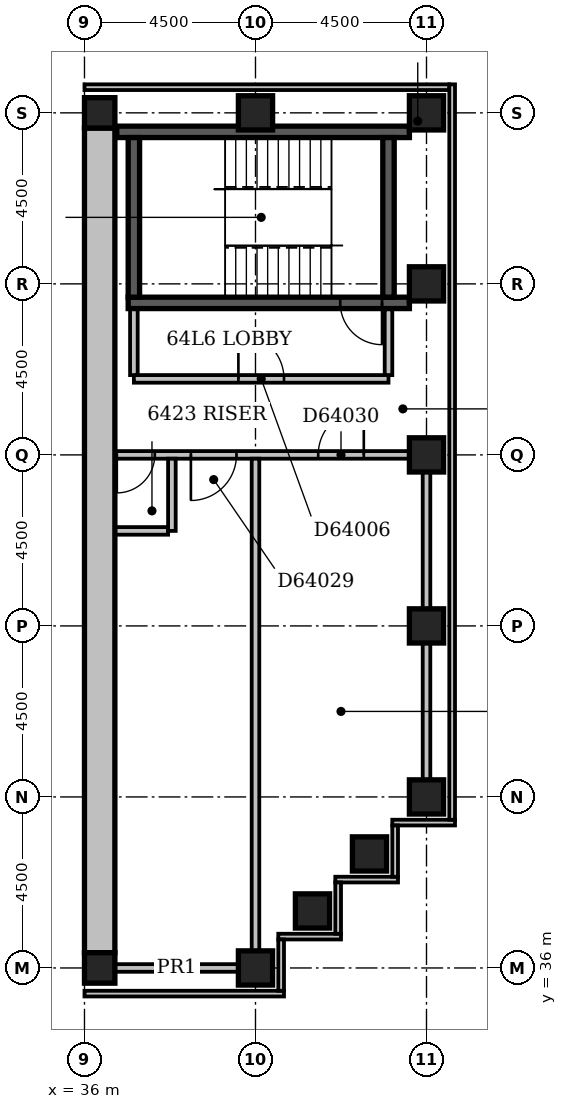
"""IFC4 building model, lengths in metres.
Left out: names, types, materials, properties, quantities, classifications, styles, units other than length and angle.
Written with IfcOpenShell. Run it as: python <this file> out.ifc"""

import sys

from ifc_helpers import new_model, si_unit, direction, frame, frame_2d, origin, origin_2d, place, context, subcontext, project, spatial, rectangle, extrude, element, fill, save


model = new_model("IFC4")
c1 = context("Model", 3, precision=1e-05, world=origin(), true_north=direction((0.0, 1.0)))
c2 = subcontext(c1, "Body", "Model", "MODEL_VIEW")
j1 = project(units=[si_unit("LENGTHUNIT", "METRE"), si_unit("PLANEANGLEUNIT", "RADIAN")], contexts=[c1])
p1 = place(None, origin())
s1 = spatial("IfcSite", under=j1, at=p1, CompositionType="ELEMENT")
p2 = place(p1, origin())
s2 = spatial("IfcBuilding", under=s1, at=p2, CompositionType="ELEMENT")
p3 = place(p2, frame((0.0, 0.0, 247.4)))
s3 = spatial("IfcBuildingStorey", under=s2, at=p3, CompositionType="ELEMENT", Elevation=247.4)
p4 = place(p3, frame((36.85, 58.0, -0.3), z_axis=(0.0, 0.0, 1.0), x_axis=(1.0, 0.0, 0.0)))
e1 = element("IfcWall", 1, at=p4, inside=s3, PredefinedType="SHEAR", context=c2, shape_type="SweptSolid", body=[
    extrude(rectangle(XDim=7.7, YDim=0.3, at=frame_2d((3.85, 0.0))), origin(), (0.0, 0.0, 1.0), 3.6),
])
p5 = place(p3, frame((37.15, 53.5, -0.3), z_axis=(0.0, 0.0, 1.0), x_axis=(1.0, 0.0, 0.0)))
e2 = element("IfcWall", 2, at=p5, inside=s3, PredefinedType="SHEAR", context=c2, shape_type="SweptSolid", body=[
    extrude(rectangle(XDim=7.4, YDim=0.3, at=frame_2d((3.7, 0.0))), origin(), (0.0, 0.0, 1.0), 3.6),
])
p6 = place(p5, frame((5.58, 0.0, 0.3)))
e3 = element("IfcOpeningElement", 3, at=p6, cuts=e2, PredefinedType="OPENING", context=c2, shape_type="SweptSolid", body=[
    extrude(rectangle(XDim=1.1, YDim=2.1, at=frame_2d((0.55, 1.05))), frame((0.0, 0.162, 0.0), z_axis=(0.0, -1.0, 0.0), x_axis=(1.0, 0.0, 0.0)), (0.0, 0.0, 1.0), 0.324),
])
for number, where, z_axis, x_axis in (
    (4, (37.3, 53.65, -0.3), (0.0, 0.0, 1.0), (0.0, 1.0, 0.0)),
    (5, (44.0, 53.65, -0.3), (0.0, 0.0, 1.0), (0.0, 1.0, 0.0)),
):
    element("IfcWall", number, at=place(p3, frame(where, z_axis=z_axis, x_axis=x_axis)), inside=s3, PredefinedType="SHEAR", context=c2, shape_type="SweptSolid", body=[
        extrude(rectangle(XDim=4.2, YDim=0.3, at=frame_2d((2.1, 0.0))), origin(), (0.0, 0.0, 1.0), 3.6),
    ])
p7 = place(p3, frame((36.4, 36.0, -0.3), z_axis=(0.0, 0.0, 1.0), x_axis=(1.0, 0.0, 0.0)))
e6 = element("IfcColumn", 6, at=p7, inside=s3, PredefinedType="COLUMN", context=c2, shape_type="SweptSolid", body=[
    extrude(rectangle(XDim=0.8, YDim=0.8, at=origin_2d()), origin(), (0.0, 0.0, 1.0), 3.6),
])
for number, where, z_axis, x_axis in (
    (7, (40.5, 36.0, -0.3), (0.0, 0.0, 1.0), (1.0, 0.0, 0.0)),
    (8, (42.0, 37.5, -0.3), (0.0, 0.0, 1.0), (1.0, 0.0, 0.0)),
    (9, (43.5, 39.0, -0.3), (0.0, 0.0, 1.0), (1.0, 0.0, 0.0)),
    (10, (45.0, 40.5, -0.3), (0.0, 0.0, 1.0), (1.0, 0.0, 0.0)),
    (11, (45.0, 45.0, -0.3), (0.0, 0.0, 1.0), (1.0, 0.0, 0.0)),
    (12, (45.0, 49.5, -0.3), (0.0, 0.0, 1.0), (1.0, 0.0, 0.0)),
    (13, (45.0, 54.0, -0.3), (0.0, 0.0, 1.0), (1.0, 0.0, 0.0)),
):
    element("IfcColumn", number, at=place(p3, frame(where, z_axis=z_axis, x_axis=x_axis)), inside=s3, PredefinedType="COLUMN", context=c2, shape_type="SweptSolid", body=[
        extrude(rectangle(XDim=0.9, YDim=0.9, at=origin_2d()), origin(), (0.0, 0.0, 1.0), 3.6),
    ])
p8 = place(p3, frame((36.4, 58.5, -0.3), z_axis=(0.0, 0.0, 1.0), x_axis=(1.0, 0.0, 0.0)))
e14 = element("IfcColumn", 14, at=p8, inside=s3, PredefinedType="COLUMN", context=c2, shape_type="SweptSolid", body=[
    extrude(rectangle(XDim=0.8, YDim=0.8, at=origin_2d()), origin(), (0.0, 0.0, 1.0), 3.6),
])
for number, where, z_axis, x_axis in (
    (15, (40.5, 58.5, -0.3), (0.0, 0.0, 1.0), (1.0, 0.0, 0.0)),
    (16, (45.0, 58.5, -0.3), (0.0, 0.0, 1.0), (1.0, 0.0, 0.0)),
):
    element("IfcColumn", number, at=place(p3, frame(where, z_axis=z_axis, x_axis=x_axis)), inside=s3, PredefinedType="COLUMN", context=c2, shape_type="SweptSolid", body=[
        extrude(rectangle(XDim=0.9, YDim=0.9, at=origin_2d()), origin(), (0.0, 0.0, 1.0), 3.6),
    ])
p9 = place(p3, frame((36.0, 35.325, 0.0), z_axis=(0.0, 0.0, 1.0), x_axis=(1.0, 0.0, 0.0)))
e17 = element("IfcWall", 17, at=p9, inside=s3, PredefinedType="STANDARD", context=c2, shape_type="SweptSolid", body=[
    extrude(rectangle(XDim=5.25, YDim=0.15, at=frame_2d((2.625, 0.0))), origin(), (0.0, 0.0, 1.0), 2.7),
])
p10 = place(p3, frame((41.175, 35.4, 0.0), z_axis=(0.0, 0.0, 1.0), x_axis=(0.0, 1.0, 0.0)))
e18 = element("IfcWall", 18, at=p10, inside=s3, PredefinedType="STANDARD", context=c2, shape_type="SweptSolid", body=[
    extrude(rectangle(XDim=1.35, YDim=0.15, at=frame_2d((0.675, 0.0))), origin(), (0.0, 0.0, 1.0), 2.7),
])
p11 = place(p3, frame((41.1, 36.825, 0.0), z_axis=(0.0, 0.0, 1.0), x_axis=(1.0, 0.0, 0.0)))
e19 = element("IfcWall", 19, at=p11, inside=s3, PredefinedType="STANDARD", context=c2, shape_type="SweptSolid", body=[
    extrude(rectangle(XDim=1.65, YDim=0.15, at=frame_2d((0.825, 0.0))), origin(), (0.0, 0.0, 1.0), 2.7),
])
p12 = place(p3, frame((42.675, 36.9, 0.0), z_axis=(0.0, 0.0, 1.0), x_axis=(0.0, 1.0, 0.0)))
e20 = element("IfcWall", 20, at=p12, inside=s3, PredefinedType="STANDARD", context=c2, shape_type="SweptSolid", body=[
    extrude(rectangle(XDim=1.35, YDim=0.15, at=frame_2d((0.675, 0.0))), origin(), (0.0, 0.0, 1.0), 2.7),
])
p13 = place(p3, frame((42.6, 38.325, 0.0), z_axis=(0.0, 0.0, 1.0), x_axis=(1.0, 0.0, 0.0)))
e21 = element("IfcWall", 21, at=p13, inside=s3, PredefinedType="STANDARD", context=c2, shape_type="SweptSolid", body=[
    extrude(rectangle(XDim=1.65, YDim=0.15, at=frame_2d((0.825, 0.0))), origin(), (0.0, 0.0, 1.0), 2.7),
])
p14 = place(p3, frame((44.175, 38.4, 0.0), z_axis=(0.0, 0.0, 1.0), x_axis=(0.0, 1.0, 0.0)))
e22 = element("IfcWall", 22, at=p14, inside=s3, PredefinedType="STANDARD", context=c2, shape_type="SweptSolid", body=[
    extrude(rectangle(XDim=1.35, YDim=0.15, at=frame_2d((0.675, 0.0))), origin(), (0.0, 0.0, 1.0), 2.7),
])
p15 = place(p3, frame((44.1, 39.825, 0.0), z_axis=(0.0, 0.0, 1.0), x_axis=(1.0, 0.0, 0.0)))
e23 = element("IfcWall", 23, at=p15, inside=s3, PredefinedType="STANDARD", context=c2, shape_type="SweptSolid", body=[
    extrude(rectangle(XDim=1.65, YDim=0.15, at=frame_2d((0.825, 0.0))), origin(), (0.0, 0.0, 1.0), 2.7),
])
p16 = place(p3, frame((45.675, 39.9, 0.0), z_axis=(0.0, 0.0, 1.0), x_axis=(0.0, 1.0, 0.0)))
e24 = element("IfcWall", 24, at=p16, inside=s3, PredefinedType="STANDARD", context=c2, shape_type="SweptSolid", body=[
    extrude(rectangle(XDim=19.35, YDim=0.15, at=frame_2d((9.675, 0.0))), origin(), (0.0, 0.0, 1.0), 2.7),
])
p17 = place(p3, frame((45.6, 59.175, 0.0), z_axis=(0.0, 0.0, 1.0), x_axis=(-1.0, 0.0, 0.0)))
e25 = element("IfcWall", 25, at=p17, inside=s3, PredefinedType="STANDARD", context=c2, shape_type="SweptSolid", body=[
    extrude(rectangle(XDim=9.6, YDim=0.15, at=frame_2d((4.8, 0.0))), origin(), (0.0, 0.0, 1.0), 2.7),
])
p18 = place(p3, frame((36.4, 36.4, 0.0), z_axis=(0.0, 0.0, 1.0), x_axis=(0.0, 1.0, 0.0)))
e26 = element("IfcWall", 26, at=p18, inside=s3, PredefinedType="STANDARD", context=c2, shape_type="SweptSolid", body=[
    extrude(rectangle(XDim=21.7, YDim=0.8, at=frame_2d((10.85, 0.0))), origin(), (0.0, 0.0, 1.0), 1.3),
])
p19 = place(p3, frame((37.3, 51.5, 0.0), z_axis=(0.0, 0.0, 1.0), x_axis=(1.0, 0.0, 0.0)))
e27 = element("IfcWall", 27, at=p19, inside=s3, PredefinedType="PARTITIONING", context=c2, shape_type="SweptSolid", body=[
    extrude(rectangle(XDim=6.7, YDim=0.2, at=frame_2d((3.35, 0.0))), origin(), (0.0, 0.0, 1.0), 3.3),
])
p20 = place(p19, frame((2.75, 0.0, 0.0)))
e28 = element("IfcOpeningElement", 28, at=p20, cuts=e27, PredefinedType="OPENING", context=c2, shape_type="SweptSolid", body=[
    extrude(rectangle(XDim=1.2, YDim=2.1, at=frame_2d((0.6, 1.05))), frame((0.0, 0.112, 0.0), z_axis=(0.0, -1.0, 0.0), x_axis=(1.0, 0.0, 0.0)), (0.0, 0.0, 1.0), 0.224),
])
for number, where, z_axis, x_axis in (
    (29, (44.0, 51.6, 0.0), (0.0, 0.0, 1.0), (0.0, 1.0, 0.0)),
    (30, (37.3, 51.6, 0.0), (0.0, 0.0, 1.0), (0.0, 1.0, 0.0)),
):
    element("IfcWall", number, at=place(p3, frame(where, z_axis=z_axis, x_axis=x_axis)), inside=s3, PredefinedType="PARTITIONING", context=c2, shape_type="SweptSolid", body=[
        extrude(rectangle(XDim=1.73, YDim=0.2, at=frame_2d((0.865, 0.0))), origin(), (0.0, 0.0, 1.0), 3.3),
    ])
p21 = place(p3, frame((36.8, 36.0, 0.0), z_axis=(0.0, 0.0, 1.0), x_axis=(1.0, 0.0, 0.0)))
e31 = element("IfcWall", 31, at=p21, inside=s3, PredefinedType="PARTITIONING", context=c2, shape_type="SweptSolid", body=[
    extrude(rectangle(XDim=3.25, YDim=0.2, at=frame_2d((1.625, 0.0))), origin(), (0.0, 0.0, 1.0), 2.7),
])
p22 = place(p3, frame((40.5, 36.45, 0.0), z_axis=(0.0, 0.0, 1.0), x_axis=(0.0, 1.0, 0.0)))
e32 = element("IfcWall", 32, at=p22, inside=s3, PredefinedType="PARTITIONING", context=c2, shape_type="SweptSolid", body=[
    extrude(rectangle(XDim=12.95, YDim=0.2, at=frame_2d((6.475, 0.0))), origin(), (0.0, 0.0, 1.0), 3.3),
])
p23 = place(p3, frame((45.0, 40.95, 0.0), z_axis=(0.0, 0.0, 1.0), x_axis=(0.0, 1.0, 0.0)))
e33 = element("IfcWall", 33, at=p23, inside=s3, PredefinedType="PARTITIONING", context=c2, shape_type="SweptSolid", body=[
    extrude(rectangle(XDim=8.1, YDim=0.2, at=frame_2d((4.05, 0.0))), origin(), (0.0, 0.0, 1.0), 2.7),
])
p24 = place(p3, frame((36.8, 47.5, 0.0), z_axis=(0.0, 0.0, 1.0), x_axis=(1.0, 0.0, 0.0)))
e34 = element("IfcWall", 34, at=p24, inside=s3, PredefinedType="PARTITIONING", context=c2, shape_type="SweptSolid", body=[
    extrude(rectangle(XDim=1.4, YDim=0.2, at=frame_2d((0.7, 0.0))), origin(), (0.0, 0.0, 1.0), 3.3),
])
p25 = place(p3, frame((38.3, 47.5, 0.0), z_axis=(0.0, 0.0, 1.0), x_axis=(0.0, 1.0, 0.0)))
e35 = element("IfcWall", 35, at=p25, inside=s3, PredefinedType="PARTITIONING", context=c2, shape_type="SweptSolid", body=[
    extrude(rectangle(XDim=1.9, YDim=0.2, at=frame_2d((0.95, 0.0))), origin(), (0.0, 0.0, 1.0), 3.3),
])
p26 = place(p3, frame((36.0, 49.5, 0.0), z_axis=(0.0, 0.0, 1.0), x_axis=(1.0, 0.0, 0.0)))
e36 = element("IfcWall", 36, at=p26, inside=s3, PredefinedType="PARTITIONING", context=c2, shape_type="SweptSolid", body=[
    extrude(rectangle(XDim=8.55, YDim=0.2, at=frame_2d((4.275, 0.0))), origin(), (0.0, 0.0, 1.0), 3.3),
])
p27 = place(p26, frame((2.8, 0.0, 0.0)))
e37 = element("IfcOpeningElement", 37, at=p27, cuts=e36, PredefinedType="OPENING", context=c2, shape_type="SweptSolid", body=[
    extrude(rectangle(XDim=1.2, YDim=2.1, at=frame_2d((0.6, 1.05))), frame((0.0, 0.112, 0.0), z_axis=(0.0, -1.0, 0.0), x_axis=(1.0, 0.0, 0.0)), (0.0, 0.0, 1.0), 0.224),
])
p28 = place(p26, frame((6.15, 0.0, 0.0)))
e38 = element("IfcOpeningElement", 38, at=p28, cuts=e36, PredefinedType="OPENING", context=c2, shape_type="SweptSolid", body=[
    extrude(rectangle(XDim=1.2, YDim=2.1, at=frame_2d((0.6, 1.05))), frame((0.0, 0.112, 0.0), z_axis=(0.0, -1.0, 0.0), x_axis=(1.0, 0.0, 0.0)), (0.0, 0.0, 1.0), 0.224),
])
p29 = place(p26, frame((0.85, 0.0, 0.0)))
e39 = element("IfcOpeningElement", 39, at=p29, cuts=e36, PredefinedType="OPENING", context=c2, shape_type="SweptSolid", body=[
    extrude(rectangle(XDim=1.0, YDim=2.1, at=frame_2d((0.5, 1.05))), frame((0.0, 0.112, 0.0), z_axis=(0.0, -1.0, 0.0), x_axis=(1.0, 0.0, 0.0)), (0.0, 0.0, 1.0), 0.224),
])
p30 = place(p20, origin())
e40 = element("IfcDoor", 40, at=p30, inside=s3, OperationType="SINGLE_SWING_LEFT", PredefinedType="DOOR", context=c2, shape_type="SweptSolid", body=[
    extrude(rectangle(XDim=1.2, YDim=2.1, at=frame_2d((0.6, 1.05))), frame((0.0, 0.025, 0.0), z_axis=(0.0, -1.0, 0.0), x_axis=(1.0, 0.0, 0.0)), (0.0, 0.0, 1.0), 0.05),
])
fill(e28, e40)
p31 = place(p6, origin())
e41 = element("IfcDoor", 41, at=p31, inside=s3, OperationType="SINGLE_SWING_RIGHT", PredefinedType="DOOR", context=c2, shape_type="SweptSolid", body=[
    extrude(rectangle(XDim=1.1, YDim=2.1, at=frame_2d((0.55, 1.05))), frame((0.0, 0.025, 0.0), z_axis=(0.0, -1.0, 0.0), x_axis=(1.0, 0.0, 0.0)), (0.0, 0.0, 1.0), 0.05),
])
fill(e3, e41)
p32 = place(p27, frame((1.2, 0.0, 0.0), z_axis=(0.0, 0.0, 1.0), x_axis=(-1.0, 0.0, 0.0)))
e42 = element("IfcDoor", 42, at=p32, inside=s3, OperationType="SINGLE_SWING_RIGHT", PredefinedType="DOOR", context=c2, shape_type="SweptSolid", body=[
    extrude(rectangle(XDim=1.2, YDim=2.1, at=frame_2d((0.6, 1.05))), frame((0.0, 0.025, 0.0), z_axis=(0.0, -1.0, 0.0), x_axis=(1.0, 0.0, 0.0)), (0.0, 0.0, 1.0), 0.05),
])
fill(e37, e42)
p33 = place(p28, frame((1.2, 0.0, 0.0), z_axis=(0.0, 0.0, 1.0), x_axis=(-1.0, 0.0, 0.0)))
e43 = element("IfcDoor", 43, at=p33, inside=s3, OperationType="SINGLE_SWING_LEFT", PredefinedType="DOOR", context=c2, shape_type="SweptSolid", body=[
    extrude(rectangle(XDim=1.2, YDim=2.1, at=frame_2d((0.6, 1.05))), frame((0.0, 0.025, 0.0), z_axis=(0.0, -1.0, 0.0), x_axis=(1.0, 0.0, 0.0)), (0.0, 0.0, 1.0), 0.05),
])
fill(e38, e43)
p34 = place(p29, frame((1.0, 0.0, 0.0), z_axis=(0.0, 0.0, 1.0), x_axis=(-1.0, 0.0, 0.0)))
e44 = element("IfcDoor", 44, at=p34, inside=s3, OperationType="SINGLE_SWING_RIGHT", PredefinedType="DOOR", context=c2, shape_type="SweptSolid", body=[
    extrude(rectangle(XDim=1.0, YDim=2.1, at=frame_2d((0.5, 1.05))), frame((0.0, 0.025, 0.0), z_axis=(0.0, -1.0, 0.0), x_axis=(1.0, 0.0, 0.0)), (0.0, 0.0, 1.0), 0.05),
])
fill(e39, e44)
save(model, sys.argv[1])
